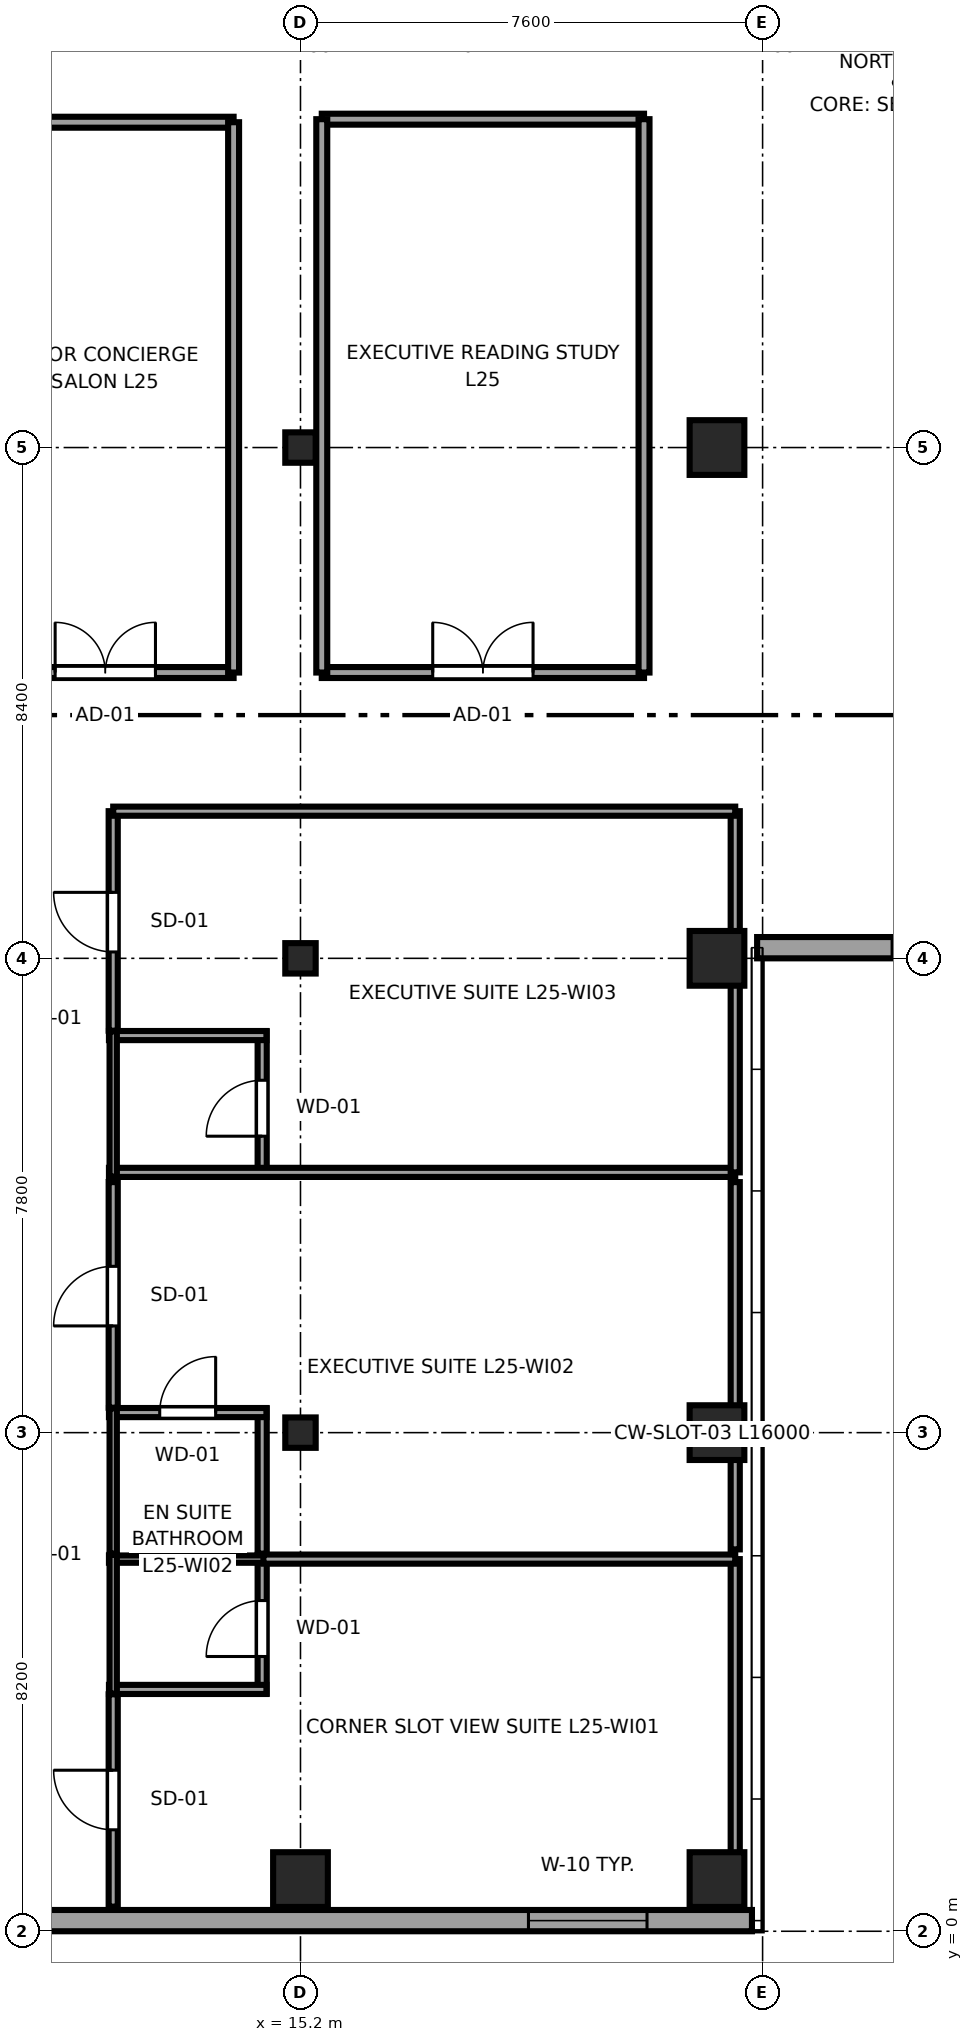
"""IFC4 building model, lengths in metres.
Left out: names, types, materials, properties, quantities, classifications, styles, units other than length and angle.
Written with IfcOpenShell. Run it as: python <this file> out.ifc"""

import sys

from ifc_helpers import new_model, si_unit, direction, frame, frame_2d, origin, origin_2d, place, context, subcontext, project, spatial, rectangle, i_section, extrude, source, transform, mapped, element, fill, save


model = new_model("IFC4")
c1 = context("Model", 3, precision=1e-05, world=origin(), true_north=direction((0.0, 1.0)))
c2 = subcontext(c1, "Body", "Model", "MODEL_VIEW")
j1 = project(units=[si_unit("LENGTHUNIT", "METRE"), si_unit("PLANEANGLEUNIT", "RADIAN")], contexts=[c1])
p1 = place(None, origin())
s1 = spatial("IfcSite", under=j1, at=p1, CompositionType="ELEMENT")
p2 = place(p1, origin())
s2 = spatial("IfcBuilding", under=s1, at=p2, CompositionType="ELEMENT")
p3 = place(p2, frame((0.0, 0.0, 100.9)))
s3 = spatial("IfcBuildingStorey", under=s2, at=p3, CompositionType="ELEMENT", Elevation=100.9)
m1 = source(origin(), c2, "Body", "SweptSolid", [
    extrude(rectangle(XDim=0.9, YDim=0.9, at=origin_2d()), origin(), (0.0, 0.0, 1.0), 3.55),
])
p4 = place(p3, frame((15.2, 0.85, 0.0), z_axis=(0.0, 0.0, 1.0), x_axis=(1.0, 0.0, 0.0)))
e1 = element("IfcColumn", 1, at=p4, inside=s3, PredefinedType="COLUMN", context=c2, shape_type="MappedRepresentation", body=[
    mapped(m1, transform((0.0, 0.0, 0.0), x_axis=(1.0, 0.0, 0.0), y_axis=(0.0, 1.0, 0.0), z_axis=(0.0, 0.0, 1.0), scale=1.0)),
])
m2 = source(origin(), c2, "Body", "SweptSolid", [
    extrude(i_section(OverallWidth=0.5, OverallDepth=0.5, WebThickness=0.022, FlangeThickness=0.034, at=origin_2d()), origin(), (0.0, 0.0, 1.0), 3.55),
])
for number, where, z_axis, x_axis in (
    (2, (15.2, 8.2, 0.0), (0.0, 0.0, 1.0), (1.0, 0.0, 0.0)),
    (3, (15.2, 16.0, 0.0), (0.0, 0.0, 1.0), (1.0, 0.0, 0.0)),
    (4, (15.2, 24.4, 0.0), (0.0, 0.0, 1.0), (1.0, 0.0, 0.0)),
):
    element("IfcColumn", number, at=place(p3, frame(where, z_axis=z_axis, x_axis=x_axis)), inside=s3, PredefinedType="COLUMN", context=c2, shape_type="MappedRepresentation", body=[
        mapped(m2, transform((0.0, 0.0, 0.0), x_axis=(1.0, 0.0, 0.0), y_axis=(0.0, 1.0, 0.0), z_axis=(0.0, 0.0, 1.0), scale=1.0)),
    ])
for number, where, z_axis, x_axis in (
    (5, (22.05, 0.85, 0.0), (0.0, 0.0, 1.0), (1.0, 0.0, 0.0)),
    (6, (22.05, 8.2, 0.0), (0.0, 0.0, 1.0), (1.0, 0.0, 0.0)),
    (7, (22.05, 16.0, 0.0), (0.0, 0.0, 1.0), (1.0, 0.0, 0.0)),
    (8, (22.05, 24.4, 0.0), (0.0, 0.0, 1.0), (1.0, 0.0, 0.0)),
):
    element("IfcColumn", number, at=place(p3, frame(where, z_axis=z_axis, x_axis=x_axis)), inside=s3, PredefinedType="COLUMN", context=c2, shape_type="MappedRepresentation", body=[
        mapped(m1, transform((0.0, 0.0, 0.0), x_axis=(1.0, 0.0, 0.0), y_axis=(0.0, 1.0, 0.0), z_axis=(0.0, 0.0, 1.0), scale=1.0)),
    ])
p5 = place(p3, frame((4.617, 0.175, 0.0), z_axis=(0.0, 0.0, 1.0), x_axis=(1.0, 0.0, 0.0)))
e9 = element("IfcWall", 9, at=p5, inside=s3, PredefinedType="SOLIDWALL", context=c2, shape_type="SweptSolid", body=[
    extrude(rectangle(XDim=18.008, YDim=0.35, at=frame_2d((9.004, 0.0))), origin(), (0.0, 0.0, 1.0), 3.37),
])
p6 = place(p5, frame((14.332, 0.0, 0.68)))
e10 = element("IfcOpeningElement", 10, at=p6, cuts=e9, PredefinedType="OPENING", context=c2, shape_type="SweptSolid", body=[
    extrude(rectangle(XDim=1.95, YDim=1.82, at=frame_2d((0.975, 0.91))), frame((0.0, 0.185, 0.0), z_axis=(0.0, -1.0, 0.0), x_axis=(1.0, 0.0, 0.0)), (0.0, 0.0, 1.0), 0.37),
])
p7 = place(p3, frame((22.71, 16.175, 0.0), z_axis=(0.0, 0.0, 1.0), x_axis=(1.0, 0.0, 0.0)))
e11 = element("IfcWall", 11, at=p7, inside=s3, PredefinedType="SOLIDWALL", context=c2, shape_type="SweptSolid", body=[
    extrude(rectangle(XDim=11.58, YDim=0.35, at=frame_2d((5.79, 0.0))), origin(), (0.0, 0.0, 1.0), 2.748),
])
p8 = place(p7, frame((2.22, 0.0, 0.68)))
e12 = element("IfcOpeningElement", 12, at=p8, cuts=e11, PredefinedType="OPENING", context=c2, shape_type="SweptSolid", body=[
    extrude(rectangle(XDim=1.95, YDim=1.82, at=frame_2d((0.975, 0.91))), frame((0.0, 0.185, 0.0), z_axis=(0.0, -1.0, 0.0), x_axis=(1.0, 0.0, 0.0)), (0.0, 0.0, 1.0), 0.37),
])
p9 = place(p7, frame((7.41, 0.0, 0.68)))
e13 = element("IfcOpeningElement", 13, at=p9, cuts=e11, PredefinedType="OPENING", context=c2, shape_type="SweptSolid", body=[
    extrude(rectangle(XDim=1.95, YDim=1.82, at=frame_2d((0.975, 0.91))), frame((0.0, 0.185, 0.0), z_axis=(0.0, -1.0, 0.0), x_axis=(1.0, 0.0, 0.0)), (0.0, 0.0, 1.0), 0.37),
])
p10 = place(p3, frame((14.57, 3.907, 0.0), z_axis=(0.0, 0.0, 1.0), x_axis=(0.0, 1.0, 0.0)))
e14 = element("IfcWall", 14, at=p10, inside=s3, PredefinedType="PARTITIONING", context=c2, shape_type="SweptSolid", body=[
    extrude(rectangle(XDim=2.283, YDim=0.15, at=frame_2d((1.142, 0.0))), origin(), (0.0, 0.0, 1.0), 3.37),
])
p11 = place(p10, frame((0.612, 0.0, 0.0)))
e15 = element("IfcOpeningElement", 15, at=p11, cuts=e14, PredefinedType="OPENING", context=c2, shape_type="SweptSolid", body=[
    extrude(rectangle(XDim=0.92, YDim=2.01, at=frame_2d((0.46, 1.005))), frame((0.0, 0.085, 0.0), z_axis=(0.0, -1.0, 0.0), x_axis=(1.0, 0.0, 0.0)), (0.0, 0.0, 1.0), 0.17),
])
p12 = place(p3, frame((12.05, 3.977, 0.0), z_axis=(0.0, 0.0, 1.0), x_axis=(1.0, 0.0, 0.0)))
e16 = element("IfcWall", 16, at=p12, inside=s3, PredefinedType="PARTITIONING", context=c2, shape_type="SweptSolid", body=[
    extrude(rectangle(XDim=2.59, YDim=0.15, at=frame_2d((1.295, 0.0))), origin(), (0.0, 0.0, 1.0), 3.37),
])
p13 = place(p3, frame((12.05, 6.12, 0.0), z_axis=(0.0, 0.0, 1.0), x_axis=(1.0, 0.0, 0.0)))
e17 = element("IfcWall", 17, at=p13, inside=s3, PredefinedType="PLUMBINGWALL", context=c2, shape_type="SweptSolid", body=[
    extrude(rectangle(XDim=2.59, YDim=0.12, at=frame_2d((1.295, 0.0))), origin(), (0.0, 0.0, 1.0), 3.37),
])
p14 = place(p3, frame((12.12, 3.907, 0.0), z_axis=(0.0, 0.0, 1.0), x_axis=(0.0, 1.0, 0.0)))
e18 = element("IfcWall", 18, at=p14, inside=s3, PredefinedType="PLUMBINGWALL", context=c2, shape_type="SweptSolid", body=[
    extrude(rectangle(XDim=2.283, YDim=0.12, at=frame_2d((1.142, 0.0))), origin(), (0.0, 0.0, 1.0), 3.37),
])
p15 = place(p3, frame((14.57, 6.21, 0.0), z_axis=(0.0, 0.0, 1.0), x_axis=(0.0, 1.0, 0.0)))
e19 = element("IfcWall", 19, at=p15, inside=s3, PredefinedType="PARTITIONING", context=c2, shape_type="SweptSolid", body=[
    extrude(rectangle(XDim=2.39, YDim=0.15, at=frame_2d((1.195, 0.0))), origin(), (0.0, 0.0, 1.0), 3.37),
])
p16 = place(p3, frame((12.05, 8.53, 0.0), z_axis=(0.0, 0.0, 1.0), x_axis=(1.0, 0.0, 0.0)))
e20 = element("IfcWall", 20, at=p16, inside=s3, PredefinedType="PARTITIONING", context=c2, shape_type="SweptSolid", body=[
    extrude(rectangle(XDim=2.59, YDim=0.15, at=frame_2d((1.295, 0.0))), origin(), (0.0, 0.0, 1.0), 3.37),
])
p17 = place(p16, frame((0.835, 0.0, 0.0)))
e21 = element("IfcOpeningElement", 21, at=p17, cuts=e20, PredefinedType="OPENING", context=c2, shape_type="SweptSolid", body=[
    extrude(rectangle(XDim=0.92, YDim=2.01, at=frame_2d((0.46, 1.005))), frame((0.0, 0.085, 0.0), z_axis=(0.0, -1.0, 0.0), x_axis=(1.0, 0.0, 0.0)), (0.0, 0.0, 1.0), 0.17),
])
p18 = place(p3, frame((12.12, 6.21, 0.0), z_axis=(0.0, 0.0, 1.0), x_axis=(0.0, 1.0, 0.0)))
e22 = element("IfcWall", 22, at=p18, inside=s3, PredefinedType="PLUMBINGWALL", context=c2, shape_type="SweptSolid", body=[
    extrude(rectangle(XDim=2.39, YDim=0.12, at=frame_2d((1.195, 0.0))), origin(), (0.0, 0.0, 1.0), 3.37),
])
p19 = place(p3, frame((14.57, 12.41, 0.0), z_axis=(0.0, 0.0, 1.0), x_axis=(0.0, 1.0, 0.0)))
e23 = element("IfcWall", 23, at=p19, inside=s3, PredefinedType="PARTITIONING", context=c2, shape_type="SweptSolid", body=[
    extrude(rectangle(XDim=2.39, YDim=0.15, at=frame_2d((1.195, 0.0))), origin(), (0.0, 0.0, 1.0), 3.37),
])
p20 = place(p19, frame((0.665, 0.0, 0.0)))
e24 = element("IfcOpeningElement", 24, at=p20, cuts=e23, PredefinedType="OPENING", context=c2, shape_type="SweptSolid", body=[
    extrude(rectangle(XDim=0.92, YDim=2.01, at=frame_2d((0.46, 1.005))), frame((0.0, 0.085, 0.0), z_axis=(0.0, -1.0, 0.0), x_axis=(1.0, 0.0, 0.0)), (0.0, 0.0, 1.0), 0.17),
])
p21 = place(p3, frame((12.05, 12.48, 0.0), z_axis=(0.0, 0.0, 1.0), x_axis=(1.0, 0.0, 0.0)))
e25 = element("IfcWall", 25, at=p21, inside=s3, PredefinedType="PARTITIONING", context=c2, shape_type="SweptSolid", body=[
    extrude(rectangle(XDim=10.3, YDim=0.15, at=frame_2d((5.15, 0.0))), origin(), (0.0, 0.0, 1.0), 3.37),
])
p22 = place(p3, frame((12.05, 14.73, 0.0), z_axis=(0.0, 0.0, 1.0), x_axis=(1.0, 0.0, 0.0)))
e26 = element("IfcWall", 26, at=p22, inside=s3, PredefinedType="PARTITIONING", context=c2, shape_type="SweptSolid", body=[
    extrude(rectangle(XDim=2.59, YDim=0.15, at=frame_2d((1.295, 0.0))), origin(), (0.0, 0.0, 1.0), 3.37),
])
p23 = place(p3, frame((12.12, 12.41, 0.0), z_axis=(0.0, 0.0, 1.0), x_axis=(0.0, 1.0, 0.0)))
e27 = element("IfcWall", 27, at=p23, inside=s3, PredefinedType="PLUMBINGWALL", context=c2, shape_type="SweptSolid", body=[
    extrude(rectangle(XDim=2.39, YDim=0.12, at=frame_2d((1.195, 0.0))), origin(), (0.0, 0.0, 1.0), 3.37),
])
p24 = place(p3, frame((12.12, 0.405, 0.0), z_axis=(0.0, 0.0, 1.0), x_axis=(0.0, 1.0, 0.0)))
e28 = element("IfcWall", 28, at=p24, inside=s3, PredefinedType="PARTITIONING", context=c2, shape_type="SweptSolid", body=[
    extrude(rectangle(XDim=3.492, YDim=0.15, at=frame_2d((1.746, 0.0))), origin(), (0.0, 0.0, 1.0), 3.37),
])
p25 = place(p24, frame((1.263, 0.0, 0.0)))
e29 = element("IfcOpeningElement", 29, at=p25, cuts=e28, PredefinedType="OPENING", context=c2, shape_type="SweptSolid", body=[
    extrude(rectangle(XDim=0.98, YDim=2.12, at=frame_2d((0.49, 1.06))), frame((0.0, 0.085, 0.0), z_axis=(0.0, -1.0, 0.0), x_axis=(1.0, 0.0, 0.0)), (0.0, 0.0, 1.0), 0.17),
])
p26 = place(p3, frame((22.35, 0.405, 0.0), z_axis=(0.0, 0.0, 1.0), x_axis=(0.0, 1.0, 0.0)))
e30 = element("IfcWall", 30, at=p26, inside=s3, PredefinedType="PARTITIONING", context=c2, shape_type="SweptSolid", body=[
    extrude(rectangle(XDim=5.715, YDim=0.15, at=frame_2d((2.857, 0.0))), origin(), (0.0, 0.0, 1.0), 3.37),
])
p27 = place(p3, frame((14.59, 6.12, 0.0), z_axis=(0.0, 0.0, 1.0), x_axis=(1.0, 0.0, 0.0)))
e31 = element("IfcWall", 31, at=p27, inside=s3, PredefinedType="PARTITIONING", context=c2, shape_type="SweptSolid", body=[
    extrude(rectangle(XDim=7.76, YDim=0.15, at=frame_2d((3.88, 0.0))), origin(), (0.0, 0.0, 1.0), 3.37),
])
p28 = place(p3, frame((12.12, 8.61, 0.0), z_axis=(0.0, 0.0, 1.0), x_axis=(0.0, 1.0, 0.0)))
e32 = element("IfcWall", 32, at=p28, inside=s3, PredefinedType="PARTITIONING", context=c2, shape_type="SweptSolid", body=[
    extrude(rectangle(XDim=3.71, YDim=0.15, at=frame_2d((1.855, 0.0))), origin(), (0.0, 0.0, 1.0), 3.37),
])
p29 = place(p28, frame((1.345, 0.0, 0.0)))
e33 = element("IfcOpeningElement", 33, at=p29, cuts=e32, PredefinedType="OPENING", context=c2, shape_type="SweptSolid", body=[
    extrude(rectangle(XDim=0.98, YDim=2.12, at=frame_2d((0.49, 1.06))), frame((0.0, 0.085, 0.0), z_axis=(0.0, -1.0, 0.0), x_axis=(1.0, 0.0, 0.0)), (0.0, 0.0, 1.0), 0.17),
])
p30 = place(p3, frame((22.35, 6.28, 0.0), z_axis=(0.0, 0.0, 1.0), x_axis=(0.0, 1.0, 0.0)))
e34 = element("IfcWall", 34, at=p30, inside=s3, PredefinedType="PARTITIONING", context=c2, shape_type="SweptSolid", body=[
    extrude(rectangle(XDim=6.04, YDim=0.15, at=frame_2d((3.02, 0.0))), origin(), (0.0, 0.0, 1.0), 3.37),
])
p31 = place(p3, frame((12.12, 14.81, 0.0), z_axis=(0.0, 0.0, 1.0), x_axis=(0.0, 1.0, 0.0)))
e35 = element("IfcWall", 35, at=p31, inside=s3, PredefinedType="PARTITIONING", context=c2, shape_type="SweptSolid", body=[
    extrude(rectangle(XDim=3.61, YDim=0.15, at=frame_2d((1.805, 0.0))), origin(), (0.0, 0.0, 1.0), 3.37),
])
p32 = place(p31, frame((1.295, 0.0, 0.0)))
e36 = element("IfcOpeningElement", 36, at=p32, cuts=e35, PredefinedType="OPENING", context=c2, shape_type="SweptSolid", body=[
    extrude(rectangle(XDim=0.98, YDim=2.12, at=frame_2d((0.49, 1.06))), frame((0.0, 0.085, 0.0), z_axis=(0.0, -1.0, 0.0), x_axis=(1.0, 0.0, 0.0)), (0.0, 0.0, 1.0), 0.17),
])
p33 = place(p3, frame((22.35, 12.48, 0.0), z_axis=(0.0, 0.0, 1.0), x_axis=(0.0, 1.0, 0.0)))
e37 = element("IfcWall", 37, at=p33, inside=s3, PredefinedType="PARTITIONING", context=c2, shape_type="SweptSolid", body=[
    extrude(rectangle(XDim=5.94, YDim=0.15, at=frame_2d((2.97, 0.0))), origin(), (0.0, 0.0, 1.0), 3.37),
])
p34 = place(p3, frame((12.12, 18.42, 0.0), z_axis=(0.0, 0.0, 1.0), x_axis=(1.0, 0.0, 0.0)))
e38 = element("IfcWall", 38, at=p34, inside=s3, PredefinedType="PARTITIONING", context=c2, shape_type="SweptSolid", body=[
    extrude(rectangle(XDim=10.23, YDim=0.15, at=frame_2d((5.115, 0.0))), origin(), (0.0, 0.0, 1.0), 3.37),
])
p35 = place(p3, frame((9.88, 20.7, 0.0), z_axis=(0.0, 0.0, 1.0), x_axis=(1.0, 0.0, 0.0)))
e39 = element("IfcWall", 39, at=p35, inside=s3, PredefinedType="PARTITIONING", context=c2, shape_type="SweptSolid", body=[
    extrude(rectangle(XDim=4.22, YDim=0.18, at=frame_2d((2.11, 0.0))), origin(), (0.0, 0.0, 1.0), 3.37),
])
p36 = place(p35, frame((1.285, 0.0, 0.0)))
e40 = element("IfcOpeningElement", 40, at=p36, cuts=e39, PredefinedType="OPENING", context=c2, shape_type="SweptSolid", body=[
    extrude(rectangle(XDim=1.65, YDim=2.15, at=frame_2d((0.825, 1.075))), frame((0.0, 0.1, 0.0), z_axis=(0.0, -1.0, 0.0), x_axis=(1.0, 0.0, 0.0)), (0.0, 0.0, 1.0), 0.2),
])
p37 = place(p3, frame((9.88, 29.75, 0.0), z_axis=(0.0, 0.0, 1.0), x_axis=(1.0, 0.0, 0.0)))
e41 = element("IfcWall", 41, at=p37, inside=s3, PredefinedType="PARTITIONING", context=c2, shape_type="SweptSolid", body=[
    extrude(rectangle(XDim=4.22, YDim=0.18, at=frame_2d((2.11, 0.0))), origin(), (0.0, 0.0, 1.0), 3.37),
])
p38 = place(p3, frame((14.1, 20.7, 0.0), z_axis=(0.0, 0.0, 1.0), x_axis=(0.0, 1.0, 0.0)))
e42 = element("IfcWall", 42, at=p38, inside=s3, PredefinedType="PARTITIONING", context=c2, shape_type="SweptSolid", body=[
    extrude(rectangle(XDim=9.05, YDim=0.18, at=frame_2d((4.525, 0.0))), origin(), (0.0, 0.0, 1.0), 3.37),
])
p39 = place(p3, frame((15.55, 20.7, 0.0), z_axis=(0.0, 0.0, 1.0), x_axis=(1.0, 0.0, 0.0)))
e43 = element("IfcWall", 43, at=p39, inside=s3, PredefinedType="PARTITIONING", context=c2, shape_type="SweptSolid", body=[
    extrude(rectangle(XDim=5.3, YDim=0.18, at=frame_2d((2.65, 0.0))), origin(), (0.0, 0.0, 1.0), 3.37),
])
p40 = place(p39, frame((1.825, 0.0, 0.0)))
e44 = element("IfcOpeningElement", 44, at=p40, cuts=e43, PredefinedType="OPENING", context=c2, shape_type="SweptSolid", body=[
    extrude(rectangle(XDim=1.65, YDim=2.15, at=frame_2d((0.825, 1.075))), frame((0.0, 0.1, 0.0), z_axis=(0.0, -1.0, 0.0), x_axis=(1.0, 0.0, 0.0)), (0.0, 0.0, 1.0), 0.2),
])
p41 = place(p3, frame((15.55, 29.8, 0.0), z_axis=(0.0, 0.0, 1.0), x_axis=(1.0, 0.0, 0.0)))
e45 = element("IfcWall", 45, at=p41, inside=s3, PredefinedType="PARTITIONING", context=c2, shape_type="SweptSolid", body=[
    extrude(rectangle(XDim=5.3, YDim=0.18, at=frame_2d((2.65, 0.0))), origin(), (0.0, 0.0, 1.0), 3.37),
])
for number, where, z_axis, x_axis in (
    (46, (15.55, 20.7, 0.0), (0.0, 0.0, 1.0), (0.0, 1.0, 0.0)),
    (47, (20.85, 20.7, 0.0), (0.0, 0.0, 1.0), (0.0, 1.0, 0.0)),
):
    element("IfcWall", number, at=place(p3, frame(where, z_axis=z_axis, x_axis=x_axis)), inside=s3, PredefinedType="PARTITIONING", context=c2, shape_type="SweptSolid", body=[
        extrude(rectangle(XDim=9.1, YDim=0.18, at=frame_2d((4.55, 0.0))), origin(), (0.0, 0.0, 1.0), 3.37),
    ])
m3 = source(origin(), c2, "Body", "SweptSolid", [
    extrude(rectangle(XDim=1.95, YDim=1.82, at=frame_2d((0.975, 0.91))), frame((0.0, 0.09, 0.0), z_axis=(0.0, -1.0, 0.0), x_axis=(1.0, 0.0, 0.0)), (0.0, 0.0, 1.0), 0.06),
])
p42 = place(p6, origin())
e48 = element("IfcWindow", 48, at=p42, inside=s3, PartitioningType="DOUBLE_PANEL_VERTICAL", PredefinedType="WINDOW", context=c2, shape_type="MappedRepresentation", body=[
    mapped(m3, transform((0.0, 0.0, 0.0), x_axis=(1.0, 0.0, 0.0), y_axis=(0.0, 1.0, 0.0), z_axis=(0.0, 0.0, 1.0), scale=1.0)),
])
fill(e10, e48)
p43 = place(p8, origin())
e49 = element("IfcWindow", 49, at=p43, inside=s3, PartitioningType="DOUBLE_PANEL_VERTICAL", PredefinedType="WINDOW", context=c2, shape_type="MappedRepresentation", body=[
    mapped(m3, transform((0.0, 0.0, 0.0), x_axis=(1.0, 0.0, 0.0), y_axis=(0.0, 1.0, 0.0), z_axis=(0.0, 0.0, 1.0), scale=1.0)),
])
fill(e12, e49)
m4 = source(origin(), c2, "Body", "SweptSolid", [
    extrude(rectangle(XDim=0.92, YDim=2.01, at=frame_2d((0.46, 1.005))), frame((0.0, 0.025, 0.0), z_axis=(0.0, -1.0, 0.0), x_axis=(1.0, 0.0, 0.0)), (0.0, 0.0, 1.0), 0.05),
])
p44 = place(p11, origin())
e50 = element("IfcDoor", 50, at=p44, inside=s3, OperationType="SINGLE_SWING_LEFT", PredefinedType="DOOR", context=c2, shape_type="MappedRepresentation", body=[
    mapped(m4, transform((0.0, 0.0, 0.0), x_axis=(1.0, 0.0, 0.0), y_axis=(0.0, 1.0, 0.0), z_axis=(0.0, 0.0, 1.0), scale=1.0)),
])
fill(e15, e50)
p45 = place(p17, origin())
e51 = element("IfcDoor", 51, at=p45, inside=s3, OperationType="SINGLE_SWING_RIGHT", PredefinedType="DOOR", context=c2, shape_type="MappedRepresentation", body=[
    mapped(m4, transform((0.0, 0.0, 0.0), x_axis=(1.0, 0.0, 0.0), y_axis=(0.0, 1.0, 0.0), z_axis=(0.0, 0.0, 1.0), scale=1.0)),
])
fill(e21, e51)
p46 = place(p20, origin())
e52 = element("IfcDoor", 52, at=p46, inside=s3, OperationType="SINGLE_SWING_LEFT", PredefinedType="DOOR", context=c2, shape_type="MappedRepresentation", body=[
    mapped(m4, transform((0.0, 0.0, 0.0), x_axis=(1.0, 0.0, 0.0), y_axis=(0.0, 1.0, 0.0), z_axis=(0.0, 0.0, 1.0), scale=1.0)),
])
fill(e24, e52)
m5 = source(origin(), c2, "Body", "SweptSolid", [
    extrude(rectangle(XDim=0.98, YDim=2.12, at=frame_2d((0.49, 1.06))), frame((0.0, 0.025, 0.0), z_axis=(0.0, -1.0, 0.0), x_axis=(1.0, 0.0, 0.0)), (0.0, 0.0, 1.0), 0.05),
])
p47 = place(p25, origin())
e53 = element("IfcDoor", 53, at=p47, inside=s3, OperationType="SINGLE_SWING_RIGHT", PredefinedType="DOOR", context=c2, shape_type="MappedRepresentation", body=[
    mapped(m5, transform((0.0, 0.0, 0.0), x_axis=(1.0, 0.0, 0.0), y_axis=(0.0, 1.0, 0.0), z_axis=(0.0, 0.0, 1.0), scale=1.0)),
])
fill(e29, e53)
p48 = place(p29, origin())
e54 = element("IfcDoor", 54, at=p48, inside=s3, OperationType="SINGLE_SWING_LEFT", PredefinedType="DOOR", context=c2, shape_type="MappedRepresentation", body=[
    mapped(m5, transform((0.0, 0.0, 0.0), x_axis=(1.0, 0.0, 0.0), y_axis=(0.0, 1.0, 0.0), z_axis=(0.0, 0.0, 1.0), scale=1.0)),
])
fill(e33, e54)
p49 = place(p32, origin())
e55 = element("IfcDoor", 55, at=p49, inside=s3, OperationType="SINGLE_SWING_RIGHT", PredefinedType="DOOR", context=c2, shape_type="MappedRepresentation", body=[
    mapped(m5, transform((0.0, 0.0, 0.0), x_axis=(1.0, 0.0, 0.0), y_axis=(0.0, 1.0, 0.0), z_axis=(0.0, 0.0, 1.0), scale=1.0)),
])
fill(e36, e55)
m6 = source(origin(), c2, "Body", "SweptSolid", [
    extrude(rectangle(XDim=1.65, YDim=2.15, at=frame_2d((0.825, 1.075))), frame((0.0, 0.025, 0.0), z_axis=(0.0, -1.0, 0.0), x_axis=(1.0, 0.0, 0.0)), (0.0, 0.0, 1.0), 0.05),
])
p50 = place(p36, origin())
e56 = element("IfcDoor", 56, at=p50, inside=s3, OperationType="DOUBLE_DOOR_SINGLE_SWING", PredefinedType="DOOR", context=c2, shape_type="MappedRepresentation", body=[
    mapped(m6, transform((0.0, 0.0, 0.0), x_axis=(1.0, 0.0, 0.0), y_axis=(0.0, 1.0, 0.0), z_axis=(0.0, 0.0, 1.0), scale=1.0)),
])
fill(e40, e56)
p51 = place(p40, origin())
e57 = element("IfcDoor", 57, at=p51, inside=s3, OperationType="DOUBLE_DOOR_SINGLE_SWING", PredefinedType="DOOR", context=c2, shape_type="MappedRepresentation", body=[
    mapped(m6, transform((0.0, 0.0, 0.0), x_axis=(1.0, 0.0, 0.0), y_axis=(0.0, 1.0, 0.0), z_axis=(0.0, 0.0, 1.0), scale=1.0)),
])
fill(e44, e57)
save(model, sys.argv[1])
